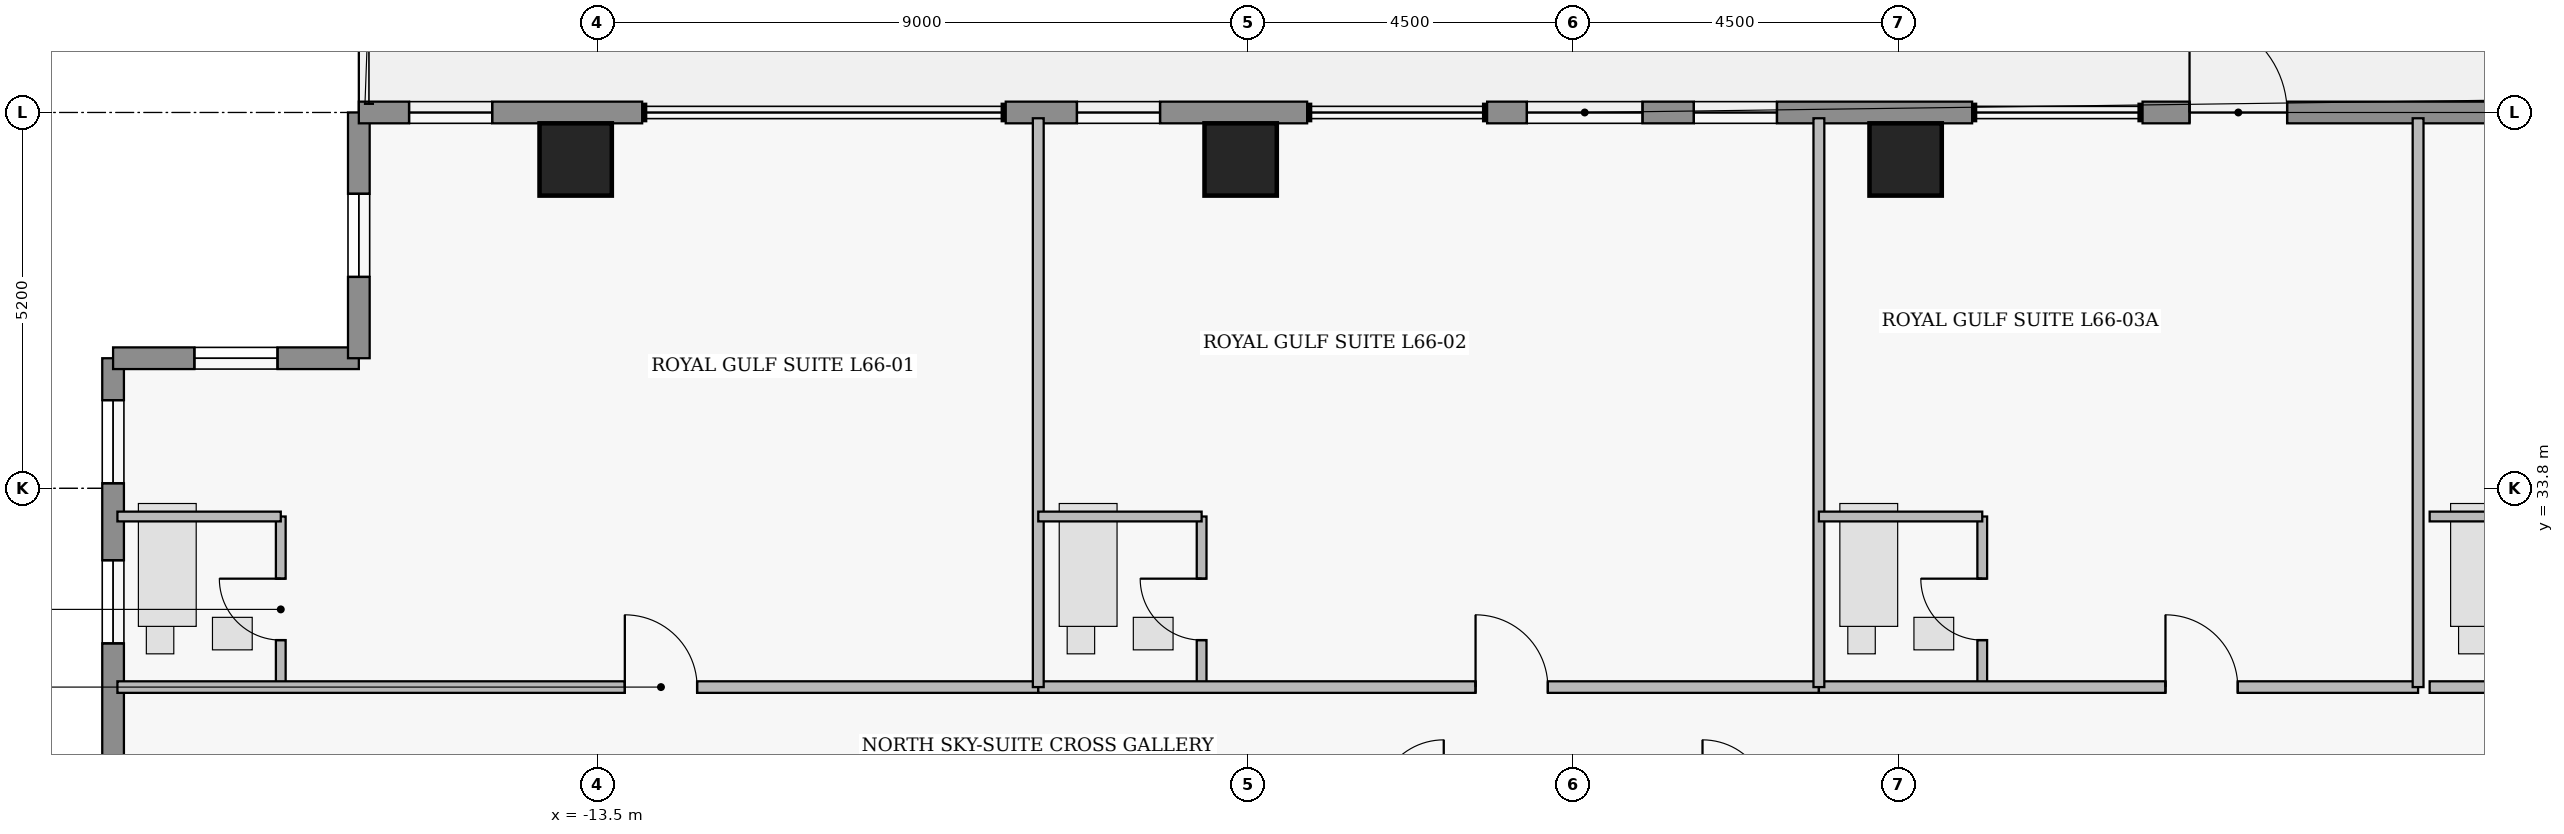
"""IFC4 building model, lengths in metres.
Left out: names, types, materials, properties, quantities, classifications, styles, units other than length and angle.
Written with IfcOpenShell. Run it as: python <this file> out.ifc"""

import sys

from ifc_helpers import new_model, si_unit, direction, frame, frame_2d, origin, origin_2d, place, context, subcontext, project, spatial, rectangle, extrude, element, fill, save


model = new_model("IFC4")
c1 = context("Model", 3, precision=1e-05, world=origin(), true_north=direction((0.0, 1.0)))
c2 = subcontext(c1, "Body", "Model", "MODEL_VIEW")
j1 = project(units=[si_unit("LENGTHUNIT", "METRE"), si_unit("PLANEANGLEUNIT", "RADIAN")], contexts=[c1])
p1 = place(None, origin())
s1 = spatial("IfcSite", under=j1, at=p1, CompositionType="ELEMENT")
p2 = place(p1, origin())
s2 = spatial("IfcBuilding", under=s1, at=p2, CompositionType="ELEMENT")
p3 = place(p2, frame((0.0, 0.0, 261.85)))
s3 = spatial("IfcBuildingStorey", under=s2, at=p3, CompositionType="ELEMENT", Elevation=261.85)
for number, where, z_axis, x_axis in (
    (1, (-13.8, 38.35, 0.0), (0.0, 0.0, 1.0), (1.0, 0.0, 0.0)),
    (2, (-4.6, 38.35, 0.0), (0.0, 0.0, 1.0), (1.0, 0.0, 0.0)),
    (3, (4.6, 38.35, 0.0), (0.0, 0.0, 1.0), (1.0, 0.0, 0.0)),
):
    element("IfcColumn", number, at=place(p3, frame(where, z_axis=z_axis, x_axis=x_axis)), inside=s3, PredefinedType="COLUMN", context=c2, shape_type="SweptSolid", body=[
        extrude(rectangle(XDim=1.0, YDim=1.0, at=origin_2d()), origin(), (0.0, 0.0, 1.0), 3.7),
    ])
p4 = place(p3, frame((-20.2, 28.93, 0.0), z_axis=(0.0, 0.0, 1.0), x_axis=(0.0, 1.0, 0.0)))
e4 = element("IfcWall", 4, at=p4, inside=s3, PredefinedType="STANDARD", context=c2, shape_type="SweptSolid", body=[
    extrude(rectangle(XDim=6.67, YDim=0.3, at=frame_2d((3.335, 0.0))), origin(), (0.0, 0.0, 1.0), 3.48),
])
p5 = place(p4, frame((2.725, 0.0, 0.95)))
e5 = element("IfcOpeningElement", 5, at=p5, cuts=e4, PredefinedType="OPENING", context=c2, shape_type="SweptSolid", body=[
    extrude(rectangle(XDim=1.15, YDim=1.55, at=frame_2d((0.575, 0.775))), frame((0.0, 0.16, 0.0), z_axis=(0.0, -1.0, 0.0), x_axis=(1.0, 0.0, 0.0)), (0.0, 0.0, 1.0), 0.32),
])
p6 = place(p4, frame((4.94, 0.0, 0.95)))
e6 = element("IfcOpeningElement", 6, at=p6, cuts=e4, PredefinedType="OPENING", context=c2, shape_type="SweptSolid", body=[
    extrude(rectangle(XDim=1.15, YDim=1.55, at=frame_2d((0.575, 0.775))), frame((0.0, 0.16, 0.0), z_axis=(0.0, -1.0, 0.0), x_axis=(1.0, 0.0, 0.0)), (0.0, 0.0, 1.0), 0.32),
])
p7 = place(p3, frame((-20.2, 35.6, 0.0), z_axis=(0.0, 0.0, 1.0), x_axis=(1.0, 0.0, 0.0)))
e7 = element("IfcWall", 7, at=p7, inside=s3, PredefinedType="STANDARD", context=c2, shape_type="SweptSolid", body=[
    extrude(rectangle(XDim=3.4, YDim=0.3, at=frame_2d((1.7, 0.0))), origin(), (0.0, 0.0, 1.0), 3.48),
])
p8 = place(p7, frame((1.125, 0.0, 1.25)))
e8 = element("IfcOpeningElement", 8, at=p8, cuts=e7, PredefinedType="OPENING", context=c2, shape_type="SweptSolid", body=[
    extrude(rectangle(XDim=1.15, YDim=1.55, at=frame_2d((0.575, 0.775))), frame((0.0, 0.16, 0.0), z_axis=(0.0, -1.0, 0.0), x_axis=(1.0, 0.0, 0.0)), (0.0, 0.0, 1.0), 0.32),
])
p9 = place(p3, frame((-16.8, 35.6, 0.0), z_axis=(0.0, 0.0, 1.0), x_axis=(0.0, 1.0, 0.0)))
e9 = element("IfcWall", 9, at=p9, inside=s3, PredefinedType="STANDARD", context=c2, shape_type="SweptSolid", body=[
    extrude(rectangle(XDim=3.4, YDim=0.3, at=frame_2d((1.7, 0.0))), origin(), (0.0, 0.0, 1.0), 3.48),
])
p10 = place(p9, frame((1.125, 0.0, 1.25)))
e10 = element("IfcOpeningElement", 10, at=p10, cuts=e9, PredefinedType="OPENING", context=c2, shape_type="SweptSolid", body=[
    extrude(rectangle(XDim=1.15, YDim=1.55, at=frame_2d((0.575, 0.775))), frame((0.0, 0.16, 0.0), z_axis=(0.0, -1.0, 0.0), x_axis=(1.0, 0.0, 0.0)), (0.0, 0.0, 1.0), 0.32),
])
p11 = place(p3, frame((-16.8, 39.0, 0.0), z_axis=(0.0, 0.0, 1.0), x_axis=(1.0, 0.0, 0.0)))
e11 = element("IfcWall", 11, at=p11, inside=s3, PredefinedType="STANDARD", context=c2, shape_type="SweptSolid", body=[
    extrude(rectangle(XDim=3.92, YDim=0.3, at=frame_2d((1.96, 0.0))), origin(), (0.0, 0.0, 1.0), 3.48),
])
p12 = place(p11, frame((0.695, 0.0, 0.95)))
e12 = element("IfcOpeningElement", 12, at=p12, cuts=e11, PredefinedType="OPENING", context=c2, shape_type="SweptSolid", body=[
    extrude(rectangle(XDim=1.15, YDim=1.55, at=frame_2d((0.575, 0.775))), frame((0.0, 0.16, 0.0), z_axis=(0.0, -1.0, 0.0), x_axis=(1.0, 0.0, 0.0)), (0.0, 0.0, 1.0), 0.32),
])
p13 = place(p3, frame((-7.85, 39.0, 0.0), z_axis=(0.0, 0.0, 1.0), x_axis=(1.0, 0.0, 0.0)))
e13 = element("IfcWall", 13, at=p13, inside=s3, PredefinedType="STANDARD", context=c2, shape_type="SweptSolid", body=[
    extrude(rectangle(XDim=4.17, YDim=0.3, at=frame_2d((2.085, 0.0))), origin(), (0.0, 0.0, 1.0), 3.48),
])
p14 = place(p13, frame((0.985, 0.0, 0.95)))
e14 = element("IfcOpeningElement", 14, at=p14, cuts=e13, PredefinedType="OPENING", context=c2, shape_type="SweptSolid", body=[
    extrude(rectangle(XDim=1.15, YDim=1.55, at=frame_2d((0.575, 0.775))), frame((0.0, 0.16, 0.0), z_axis=(0.0, -1.0, 0.0), x_axis=(1.0, 0.0, 0.0)), (0.0, 0.0, 1.0), 0.32),
])
p15 = place(p3, frame((-1.19, 39.0, 0.0), z_axis=(0.0, 0.0, 1.0), x_axis=(1.0, 0.0, 0.0)))
e15 = element("IfcWall", 15, at=p15, inside=s3, PredefinedType="STANDARD", context=c2, shape_type="SweptSolid", body=[
    extrude(rectangle(XDim=6.71, YDim=0.3, at=frame_2d((3.355, 0.0))), origin(), (0.0, 0.0, 1.0), 3.48),
])
p16 = place(p15, frame((0.55, 0.0, 0.85)))
e16 = element("IfcOpeningElement", 16, at=p16, cuts=e15, PredefinedType="OPENING", context=c2, shape_type="SweptSolid", body=[
    extrude(rectangle(XDim=1.6, YDim=1.8, at=frame_2d((0.8, 0.9))), frame((0.0, 0.16, 0.0), z_axis=(0.0, -1.0, 0.0), x_axis=(1.0, 0.0, 0.0)), (0.0, 0.0, 1.0), 0.32),
])
p17 = place(p15, frame((2.86, 0.0, 0.95)))
e17 = element("IfcOpeningElement", 17, at=p17, cuts=e15, PredefinedType="OPENING", context=c2, shape_type="SweptSolid", body=[
    extrude(rectangle(XDim=1.15, YDim=1.55, at=frame_2d((0.575, 0.775))), frame((0.0, 0.16, 0.0), z_axis=(0.0, -1.0, 0.0), x_axis=(1.0, 0.0, 0.0)), (0.0, 0.0, 1.0), 0.32),
])
p18 = place(p3, frame((7.878, 39.0, 0.0), z_axis=(0.0, 0.0, 1.0), x_axis=(1.0, 0.0, 0.0)))
e18 = element("IfcWall", 18, at=p18, inside=s3, PredefinedType="STANDARD", context=c2, shape_type="SweptSolid", body=[
    extrude(rectangle(XDim=8.922, YDim=0.3, at=frame_2d((4.461, 0.0))), origin(), (0.0, 0.0, 1.0), 3.48),
])
p19 = place(p18, frame((0.65, 0.0, 0.0)))
e19 = element("IfcOpeningElement", 19, at=p19, cuts=e18, PredefinedType="OPENING", context=c2, shape_type="SweptSolid", body=[
    extrude(rectangle(XDim=1.35, YDim=2.3, at=frame_2d((0.675, 1.15))), frame((0.0, 0.16, 0.0), z_axis=(0.0, -1.0, 0.0), x_axis=(1.0, 0.0, 0.0)), (0.0, 0.0, 1.0), 0.32),
])
p20 = place(p18, frame((7.077, 0.0, 0.95)))
e20 = element("IfcOpeningElement", 20, at=p20, cuts=e18, PredefinedType="OPENING", context=c2, shape_type="SweptSolid", body=[
    extrude(rectangle(XDim=1.15, YDim=1.55, at=frame_2d((0.575, 0.775))), frame((0.0, 0.16, 0.0), z_axis=(0.0, -1.0, 0.0), x_axis=(1.0, 0.0, 0.0)), (0.0, 0.0, 1.0), 0.32),
])
p21 = place(p3, frame((-17.88, 31.05, 0.0), z_axis=(0.0, 0.0, 1.0), x_axis=(0.0, 1.0, 0.0)))
e21 = element("IfcWall", 21, at=p21, inside=s3, PredefinedType="PLUMBINGWALL", context=c2, shape_type="SweptSolid", body=[
    extrude(rectangle(XDim=2.36, YDim=0.135, at=frame_2d((1.18, 0.0))), origin(), (0.0, 0.0, 1.0), 3.48),
])
p22 = place(p21, frame((0.65, 0.0, 0.0)))
e22 = element("IfcOpeningElement", 22, at=p22, cuts=e21, PredefinedType="OPENING", context=c2, shape_type="SweptSolid", body=[
    extrude(rectangle(XDim=0.85, YDim=2.1, at=frame_2d((0.425, 1.05))), frame((0.0, 0.077, 0.0), z_axis=(0.0, -1.0, 0.0), x_axis=(1.0, 0.0, 0.0)), (0.0, 0.0, 1.0), 0.155),
])
p23 = place(p3, frame((-20.14, 31.05, 0.0), z_axis=(0.0, 0.0, 1.0), x_axis=(1.0, 0.0, 0.0)))
e23 = element("IfcWall", 23, at=p23, inside=s3, PredefinedType="PARTITIONING", context=c2, shape_type="SweptSolid", body=[
    extrude(rectangle(XDim=12.74, YDim=0.16, at=frame_2d((6.37, 0.0))), origin(), (0.0, 0.0, 1.0), 3.48),
])
p24 = place(p23, frame((7.02, 0.0, 0.0)))
e24 = element("IfcOpeningElement", 24, at=p24, cuts=e23, PredefinedType="OPENING", context=c2, shape_type="SweptSolid", body=[
    extrude(rectangle(XDim=1.0, YDim=2.15, at=frame_2d((0.5, 1.075))), frame((0.0, 0.09, 0.0), z_axis=(0.0, -1.0, 0.0), x_axis=(1.0, 0.0, 0.0)), (0.0, 0.0, 1.0), 0.18),
])
p25 = place(p3, frame((-5.14, 31.05, 0.0), z_axis=(0.0, 0.0, 1.0), x_axis=(0.0, 1.0, 0.0)))
e25 = element("IfcWall", 25, at=p25, inside=s3, PredefinedType="PLUMBINGWALL", context=c2, shape_type="SweptSolid", body=[
    extrude(rectangle(XDim=2.36, YDim=0.135, at=frame_2d((1.18, 0.0))), origin(), (0.0, 0.0, 1.0), 3.48),
])
p26 = place(p25, frame((0.65, 0.0, 0.0)))
e26 = element("IfcOpeningElement", 26, at=p26, cuts=e25, PredefinedType="OPENING", context=c2, shape_type="SweptSolid", body=[
    extrude(rectangle(XDim=0.85, YDim=2.1, at=frame_2d((0.425, 1.05))), frame((0.0, 0.077, 0.0), z_axis=(0.0, -1.0, 0.0), x_axis=(1.0, 0.0, 0.0)), (0.0, 0.0, 1.0), 0.155),
])
p27 = place(p3, frame((-7.4, 31.05, 0.0), z_axis=(0.0, 0.0, 1.0), x_axis=(1.0, 0.0, 0.0)))
e27 = element("IfcWall", 27, at=p27, inside=s3, PredefinedType="PARTITIONING", context=c2, shape_type="SweptSolid", body=[
    extrude(rectangle(XDim=10.8, YDim=0.16, at=frame_2d((5.4, 0.0))), origin(), (0.0, 0.0, 1.0), 3.48),
])
p28 = place(p27, frame((6.05, 0.0, 0.0)))
e28 = element("IfcOpeningElement", 28, at=p28, cuts=e27, PredefinedType="OPENING", context=c2, shape_type="SweptSolid", body=[
    extrude(rectangle(XDim=1.0, YDim=2.15, at=frame_2d((0.5, 1.075))), frame((0.0, 0.09, 0.0), z_axis=(0.0, -1.0, 0.0), x_axis=(1.0, 0.0, 0.0)), (0.0, 0.0, 1.0), 0.18),
])
p29 = place(p3, frame((5.66, 31.05, 0.0), z_axis=(0.0, 0.0, 1.0), x_axis=(0.0, 1.0, 0.0)))
e29 = element("IfcWall", 29, at=p29, inside=s3, PredefinedType="PLUMBINGWALL", context=c2, shape_type="SweptSolid", body=[
    extrude(rectangle(XDim=2.36, YDim=0.135, at=frame_2d((1.18, 0.0))), origin(), (0.0, 0.0, 1.0), 3.48),
])
p30 = place(p29, frame((0.65, 0.0, 0.0)))
e30 = element("IfcOpeningElement", 30, at=p30, cuts=e29, PredefinedType="OPENING", context=c2, shape_type="SweptSolid", body=[
    extrude(rectangle(XDim=0.85, YDim=2.1, at=frame_2d((0.425, 1.05))), frame((0.0, 0.077, 0.0), z_axis=(0.0, -1.0, 0.0), x_axis=(1.0, 0.0, 0.0)), (0.0, 0.0, 1.0), 0.155),
])
p31 = place(p3, frame((3.4, 31.05, 0.0), z_axis=(0.0, 0.0, 1.0), x_axis=(1.0, 0.0, 0.0)))
e31 = element("IfcWall", 31, at=p31, inside=s3, PredefinedType="PARTITIONING", context=c2, shape_type="SweptSolid", body=[
    extrude(rectangle(XDim=8.29, YDim=0.16, at=frame_2d((4.145, 0.0))), origin(), (0.0, 0.0, 1.0), 3.48),
])
p32 = place(p31, frame((4.795, 0.0, 0.0)))
e32 = element("IfcOpeningElement", 32, at=p32, cuts=e31, PredefinedType="OPENING", context=c2, shape_type="SweptSolid", body=[
    extrude(rectangle(XDim=1.0, YDim=2.15, at=frame_2d((0.5, 1.075))), frame((0.0, 0.09, 0.0), z_axis=(0.0, -1.0, 0.0), x_axis=(1.0, 0.0, 0.0)), (0.0, 0.0, 1.0), 0.18),
])
p33 = place(p3, frame((11.85, 31.05, 0.0), z_axis=(0.0, 0.0, 1.0), x_axis=(1.0, 0.0, 0.0)))
e33 = element("IfcWall", 33, at=p33, inside=s3, PredefinedType="PARTITIONING", context=c2, shape_type="SweptSolid", body=[
    extrude(rectangle(XDim=8.29, YDim=0.16, at=frame_2d((4.145, 0.0))), origin(), (0.0, 0.0, 1.0), 3.48),
])
p34 = place(p33, frame((4.795, 0.0, 0.0)))
e34 = element("IfcOpeningElement", 34, at=p34, cuts=e33, PredefinedType="OPENING", context=c2, shape_type="SweptSolid", body=[
    extrude(rectangle(XDim=1.0, YDim=2.15, at=frame_2d((0.5, 1.075))), frame((0.0, 0.09, 0.0), z_axis=(0.0, -1.0, 0.0), x_axis=(1.0, 0.0, 0.0)), (0.0, 0.0, 1.0), 0.18),
])
p35 = place(p3, frame((-20.14, 33.41, 0.0), z_axis=(0.0, 0.0, 1.0), x_axis=(1.0, 0.0, 0.0)))
e35 = element("IfcWall", 35, at=p35, inside=s3, PredefinedType="PLUMBINGWALL", context=c2, shape_type="SweptSolid", body=[
    extrude(rectangle(XDim=2.26, YDim=0.135, at=frame_2d((1.13, 0.0))), origin(), (0.0, 0.0, 1.0), 3.48),
])
p36 = place(p3, frame((-7.4, 31.05, 0.0), z_axis=(0.0, 0.0, 1.0), x_axis=(0.0, 1.0, 0.0)))
e36 = element("IfcWall", 36, at=p36, inside=s3, PredefinedType="PARTITIONING", context=c2, shape_type="SweptSolid", body=[
    extrude(rectangle(XDim=7.87, YDim=0.15, at=frame_2d((3.935, 0.0))), origin(), (0.0, 0.0, 1.0), 3.48),
])
p37 = place(p3, frame((-7.4, 33.41, 0.0), z_axis=(0.0, 0.0, 1.0), x_axis=(1.0, 0.0, 0.0)))
e37 = element("IfcWall", 37, at=p37, inside=s3, PredefinedType="PLUMBINGWALL", context=c2, shape_type="SweptSolid", body=[
    extrude(rectangle(XDim=2.26, YDim=0.135, at=frame_2d((1.13, 0.0))), origin(), (0.0, 0.0, 1.0), 3.076),
])
p38 = place(p3, frame((3.4, 31.05, 0.0), z_axis=(0.0, 0.0, 1.0), x_axis=(0.0, 1.0, 0.0)))
e38 = element("IfcWall", 38, at=p38, inside=s3, PredefinedType="PARTITIONING", context=c2, shape_type="SweptSolid", body=[
    extrude(rectangle(XDim=7.87, YDim=0.15, at=frame_2d((3.935, 0.0))), origin(), (0.0, 0.0, 1.0), 3.48),
])
p39 = place(p3, frame((3.4, 33.41, 0.0), z_axis=(0.0, 0.0, 1.0), x_axis=(1.0, 0.0, 0.0)))
e39 = element("IfcWall", 39, at=p39, inside=s3, PredefinedType="PLUMBINGWALL", context=c2, shape_type="SweptSolid", body=[
    extrude(rectangle(XDim=2.26, YDim=0.135, at=frame_2d((1.13, 0.0))), origin(), (0.0, 0.0, 1.0), 3.076),
])
p40 = place(p3, frame((11.69, 31.05, 0.0), z_axis=(0.0, 0.0, 1.0), x_axis=(0.0, 1.0, 0.0)))
e40 = element("IfcWall", 40, at=p40, inside=s3, PredefinedType="PARTITIONING", context=c2, shape_type="SweptSolid", body=[
    extrude(rectangle(XDim=7.87, YDim=0.15, at=frame_2d((3.935, 0.0))), origin(), (0.0, 0.0, 1.0), 3.48),
])
p41 = place(p3, frame((11.85, 33.41, 0.0), z_axis=(0.0, 0.0, 1.0), x_axis=(1.0, 0.0, 0.0)))
e41 = element("IfcWall", 41, at=p41, inside=s3, PredefinedType="PLUMBINGWALL", context=c2, shape_type="SweptSolid", body=[
    extrude(rectangle(XDim=2.26, YDim=0.135, at=frame_2d((1.13, 0.0))), origin(), (0.0, 0.0, 1.0), 3.076),
])
p42 = place(p5, origin())
e42 = element("IfcWindow", 42, at=p42, inside=s3, PartitioningType="SINGLE_PANEL", PredefinedType="WINDOW", context=c2, shape_type="SweptSolid", body=[
    extrude(rectangle(XDim=1.15, YDim=1.55, at=frame_2d((0.575, 0.775))), frame((0.0, 0.03, 0.0), z_axis=(0.0, -1.0, 0.0), x_axis=(1.0, 0.0, 0.0)), (0.0, 0.0, 1.0), 0.06),
])
fill(e5, e42)
p43 = place(p6, origin())
e43 = element("IfcWindow", 43, at=p43, inside=s3, PartitioningType="SINGLE_PANEL", PredefinedType="WINDOW", context=c2, shape_type="SweptSolid", body=[
    extrude(rectangle(XDim=1.15, YDim=1.55, at=frame_2d((0.575, 0.775))), frame((0.0, 0.03, 0.0), z_axis=(0.0, -1.0, 0.0), x_axis=(1.0, 0.0, 0.0)), (0.0, 0.0, 1.0), 0.06),
])
fill(e6, e43)
p44 = place(p8, origin())
e44 = element("IfcWindow", 44, at=p44, inside=s3, PartitioningType="SINGLE_PANEL", PredefinedType="WINDOW", context=c2, shape_type="SweptSolid", body=[
    extrude(rectangle(XDim=1.15, YDim=1.55, at=frame_2d((0.575, 0.775))), frame((0.0, 0.03, 0.0), z_axis=(0.0, -1.0, 0.0), x_axis=(1.0, 0.0, 0.0)), (0.0, 0.0, 1.0), 0.06),
])
fill(e8, e44)
p45 = place(p10, origin())
e45 = element("IfcWindow", 45, at=p45, inside=s3, PartitioningType="SINGLE_PANEL", PredefinedType="WINDOW", context=c2, shape_type="SweptSolid", body=[
    extrude(rectangle(XDim=1.15, YDim=1.55, at=frame_2d((0.575, 0.775))), frame((0.0, 0.03, 0.0), z_axis=(0.0, -1.0, 0.0), x_axis=(1.0, 0.0, 0.0)), (0.0, 0.0, 1.0), 0.06),
])
fill(e10, e45)
p46 = place(p12, origin())
e46 = element("IfcWindow", 46, at=p46, inside=s3, PartitioningType="SINGLE_PANEL", PredefinedType="WINDOW", context=c2, shape_type="SweptSolid", body=[
    extrude(rectangle(XDim=1.15, YDim=1.55, at=frame_2d((0.575, 0.775))), frame((0.0, 0.03, 0.0), z_axis=(0.0, -1.0, 0.0), x_axis=(1.0, 0.0, 0.0)), (0.0, 0.0, 1.0), 0.06),
])
fill(e12, e46)
p47 = place(p14, origin())
e47 = element("IfcWindow", 47, at=p47, inside=s3, PartitioningType="SINGLE_PANEL", PredefinedType="WINDOW", context=c2, shape_type="SweptSolid", body=[
    extrude(rectangle(XDim=1.15, YDim=1.55, at=frame_2d((0.575, 0.775))), frame((0.0, 0.03, 0.0), z_axis=(0.0, -1.0, 0.0), x_axis=(1.0, 0.0, 0.0)), (0.0, 0.0, 1.0), 0.06),
])
fill(e14, e47)
p48 = place(p16, origin())
e48 = element("IfcWindow", 48, at=p48, inside=s3, PartitioningType="SINGLE_PANEL", PredefinedType="WINDOW", context=c2, shape_type="SweptSolid", body=[
    extrude(rectangle(XDim=1.6, YDim=1.8, at=frame_2d((0.8, 0.9))), frame((0.0, 0.03, 0.0), z_axis=(0.0, -1.0, 0.0), x_axis=(1.0, 0.0, 0.0)), (0.0, 0.0, 1.0), 0.06),
])
fill(e16, e48)
p49 = place(p17, origin())
e49 = element("IfcWindow", 49, at=p49, inside=s3, PartitioningType="SINGLE_PANEL", PredefinedType="WINDOW", context=c2, shape_type="SweptSolid", body=[
    extrude(rectangle(XDim=1.15, YDim=1.55, at=frame_2d((0.575, 0.775))), frame((0.0, 0.03, 0.0), z_axis=(0.0, -1.0, 0.0), x_axis=(1.0, 0.0, 0.0)), (0.0, 0.0, 1.0), 0.06),
])
fill(e17, e49)
p50 = place(p19, origin())
e50 = element("IfcDoor", 50, at=p50, inside=s3, OperationType="SINGLE_SWING_LEFT", PredefinedType="DOOR", context=c2, shape_type="SweptSolid", body=[
    extrude(rectangle(XDim=1.35, YDim=2.3, at=frame_2d((0.675, 1.15))), frame((0.0, 0.025, 0.0), z_axis=(0.0, -1.0, 0.0), x_axis=(1.0, 0.0, 0.0)), (0.0, 0.0, 1.0), 0.05),
])
fill(e19, e50)
p51 = place(p22, origin())
e51 = element("IfcDoor", 51, at=p51, inside=s3, OperationType="SINGLE_SWING_RIGHT", PredefinedType="DOOR", context=c2, shape_type="SweptSolid", body=[
    extrude(rectangle(XDim=0.85, YDim=2.1, at=frame_2d((0.425, 1.05))), frame((0.0, 0.025, 0.0), z_axis=(0.0, -1.0, 0.0), x_axis=(1.0, 0.0, 0.0)), (0.0, 0.0, 1.0), 0.05),
])
fill(e22, e51)
p52 = place(p24, origin())
e52 = element("IfcDoor", 52, at=p52, inside=s3, OperationType="SINGLE_SWING_LEFT", PredefinedType="DOOR", context=c2, shape_type="SweptSolid", body=[
    extrude(rectangle(XDim=1.0, YDim=2.15, at=frame_2d((0.5, 1.075))), frame((0.0, 0.025, 0.0), z_axis=(0.0, -1.0, 0.0), x_axis=(1.0, 0.0, 0.0)), (0.0, 0.0, 1.0), 0.05),
])
fill(e24, e52)
p53 = place(p26, origin())
e53 = element("IfcDoor", 53, at=p53, inside=s3, OperationType="SINGLE_SWING_RIGHT", PredefinedType="DOOR", context=c2, shape_type="SweptSolid", body=[
    extrude(rectangle(XDim=0.85, YDim=2.1, at=frame_2d((0.425, 1.05))), frame((0.0, 0.025, 0.0), z_axis=(0.0, -1.0, 0.0), x_axis=(1.0, 0.0, 0.0)), (0.0, 0.0, 1.0), 0.05),
])
fill(e26, e53)
p54 = place(p28, origin())
e54 = element("IfcDoor", 54, at=p54, inside=s3, OperationType="SINGLE_SWING_LEFT", PredefinedType="DOOR", context=c2, shape_type="SweptSolid", body=[
    extrude(rectangle(XDim=1.0, YDim=2.15, at=frame_2d((0.5, 1.075))), frame((0.0, 0.025, 0.0), z_axis=(0.0, -1.0, 0.0), x_axis=(1.0, 0.0, 0.0)), (0.0, 0.0, 1.0), 0.05),
])
fill(e28, e54)
p55 = place(p30, origin())
e55 = element("IfcDoor", 55, at=p55, inside=s3, OperationType="SINGLE_SWING_RIGHT", PredefinedType="DOOR", context=c2, shape_type="SweptSolid", body=[
    extrude(rectangle(XDim=0.85, YDim=2.1, at=frame_2d((0.425, 1.05))), frame((0.0, 0.025, 0.0), z_axis=(0.0, -1.0, 0.0), x_axis=(1.0, 0.0, 0.0)), (0.0, 0.0, 1.0), 0.05),
])
fill(e30, e55)
p56 = place(p32, origin())
e56 = element("IfcDoor", 56, at=p56, inside=s3, OperationType="SINGLE_SWING_LEFT", PredefinedType="DOOR", context=c2, shape_type="SweptSolid", body=[
    extrude(rectangle(XDim=1.0, YDim=2.15, at=frame_2d((0.5, 1.075))), frame((0.0, 0.025, 0.0), z_axis=(0.0, -1.0, 0.0), x_axis=(1.0, 0.0, 0.0)), (0.0, 0.0, 1.0), 0.05),
])
fill(e32, e56)
save(model, sys.argv[1])
